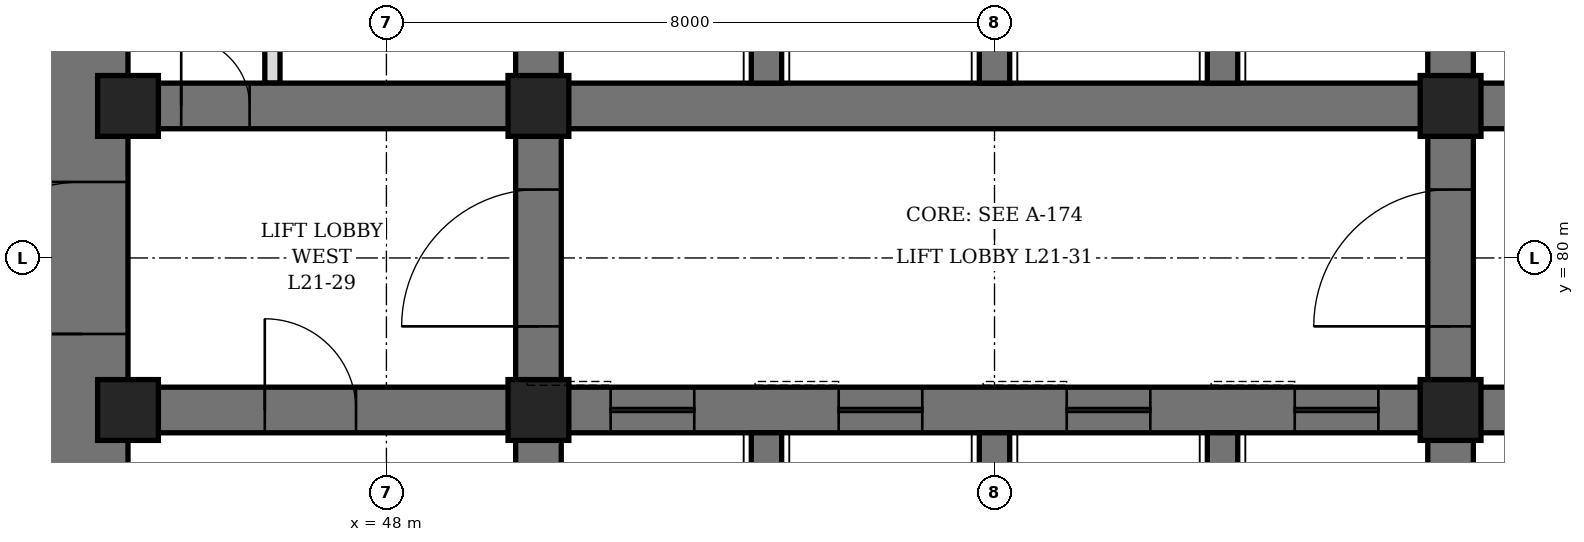
"""IFC4 building model, lengths in metres.
Left out: names, types, materials, properties, quantities, classifications, styles, units other than length and angle.
Written with IfcOpenShell. Run it as: python <this file> out.ifc"""

import sys

from ifc_helpers import new_model, si_unit, direction, frame, frame_2d, origin, origin_2d, place, context, subcontext, project, spatial, rectangle, hollow_rectangle, extrude, element, fill, save


model = new_model("IFC4")
c1 = context("Model", 3, precision=1e-05, world=origin(), true_north=direction((0.0, 1.0)))
c2 = subcontext(c1, "Body", "Model", "MODEL_VIEW")
j1 = project(units=[si_unit("LENGTHUNIT", "METRE"), si_unit("PLANEANGLEUNIT", "RADIAN")], contexts=[c1])
p1 = place(None, origin())
s1 = spatial("IfcSite", under=j1, at=p1, CompositionType="ELEMENT")
p2 = place(p1, origin())
s2 = spatial("IfcBuilding", under=s1, at=p2, CompositionType="ELEMENT")
p3 = place(p2, frame((0.0, 0.0, 97.9)))
s3 = spatial("IfcBuildingStorey", under=s2, at=p3, CompositionType="ELEMENT", Elevation=97.9)
p4 = place(p3, frame((44.0, 70.4, 0.0), z_axis=(0.0, 0.0, 1.0), x_axis=(0.0, 1.0, 0.0)))
e1 = element("IfcWall", 1, at=p4, inside=s3, PredefinedType="SHEAR", context=c2, shape_type="SweptSolid", body=[
    extrude(rectangle(XDim=19.2, YDim=1.2, at=frame_2d((9.6, 0.0))), origin(), (0.0, 0.0, 1.0), 4.2),
])
p5 = place(p4, frame((8.6, 0.0, 0.0)))
e2 = element("IfcOpeningElement", 2, at=p5, cuts=e1, PredefinedType="OPENING", context=c2, shape_type="SweptSolid", body=[
    extrude(rectangle(XDim=2.0, YDim=2.4, at=frame_2d((1.0, 1.2))), frame((0.0, 0.61, 0.0), z_axis=(0.0, -1.0, 0.0), x_axis=(1.0, 0.0, 0.0)), (0.0, 0.0, 1.0), 1.22),
])
p6 = place(p3, frame((50.0, 71.6, 0.0), z_axis=(0.0, 0.0, 1.0), x_axis=(0.0, 1.0, 0.0)))
e3 = element("IfcWall", 3, at=p6, inside=s3, PredefinedType="SHEAR", context=c2, shape_type="SweptSolid", body=[
    extrude(rectangle(XDim=16.8, YDim=0.6, at=frame_2d((8.4, 0.0))), origin(), (0.0, 0.0, 1.0), 4.2),
])
p7 = place(p6, frame((7.5, 0.0, 0.0)))
e4 = element("IfcOpeningElement", 4, at=p7, cuts=e3, PredefinedType="OPENING", context=c2, shape_type="SweptSolid", body=[
    extrude(rectangle(XDim=1.8, YDim=2.4, at=frame_2d((0.9, 1.2))), frame((0.0, 0.31, 0.0), z_axis=(0.0, -1.0, 0.0), x_axis=(1.0, 0.0, 0.0)), (0.0, 0.0, 1.0), 0.62),
])
p8 = place(p3, frame((62.0, 71.6, 0.0), z_axis=(0.0, 0.0, 1.0), x_axis=(0.0, 1.0, 0.0)))
e5 = element("IfcWall", 5, at=p8, inside=s3, PredefinedType="SHEAR", context=c2, shape_type="SweptSolid", body=[
    extrude(rectangle(XDim=16.8, YDim=0.6, at=frame_2d((8.4, 0.0))), origin(), (0.0, 0.0, 1.0), 4.2),
])
p9 = place(p8, frame((7.5, 0.0, 0.0)))
e6 = element("IfcOpeningElement", 6, at=p9, cuts=e5, PredefinedType="OPENING", context=c2, shape_type="SweptSolid", body=[
    extrude(rectangle(XDim=1.8, YDim=2.4, at=frame_2d((0.9, 1.2))), frame((0.0, 0.31, 0.0), z_axis=(0.0, -1.0, 0.0), x_axis=(1.0, 0.0, 0.0)), (0.0, 0.0, 1.0), 0.62),
])
p10 = place(p3, frame((44.6, 78.0, 0.0), z_axis=(0.0, 0.0, 1.0), x_axis=(1.0, 0.0, 0.0)))
e7 = element("IfcWall", 7, at=p10, inside=s3, PredefinedType="SHEAR", context=c2, shape_type="SweptSolid", body=[
    extrude(rectangle(XDim=5.1, YDim=0.6, at=frame_2d((2.55, 0.0))), origin(), (0.0, 0.0, 1.0), 4.2),
])
p11 = place(p10, frame((1.8, 0.0, 0.0)))
e8 = element("IfcOpeningElement", 8, at=p11, cuts=e7, PredefinedType="OPENING", context=c2, shape_type="SweptSolid", body=[
    extrude(rectangle(XDim=1.2, YDim=2.1, at=frame_2d((0.6, 1.05))), frame((0.0, 0.31, 0.0), z_axis=(0.0, -1.0, 0.0), x_axis=(1.0, 0.0, 0.0)), (0.0, 0.0, 1.0), 0.62),
])
p12 = place(p3, frame((44.6, 82.0, 0.0), z_axis=(0.0, 0.0, 1.0), x_axis=(1.0, 0.0, 0.0)))
e9 = element("IfcWall", 9, at=p12, inside=s3, PredefinedType="SHEAR", context=c2, shape_type="SweptSolid", body=[
    extrude(rectangle(XDim=5.1, YDim=0.6, at=frame_2d((2.55, 0.0))), origin(), (0.0, 0.0, 1.0), 4.2),
])
p13 = place(p12, frame((0.7, 0.0, 0.0)))
e10 = element("IfcOpeningElement", 10, at=p13, cuts=e9, PredefinedType="OPENING", context=c2, shape_type="SweptSolid", body=[
    extrude(rectangle(XDim=0.9, YDim=2.1, at=frame_2d((0.45, 1.05))), frame((0.0, 0.31, 0.0), z_axis=(0.0, -1.0, 0.0), x_axis=(1.0, 0.0, 0.0)), (0.0, 0.0, 1.0), 0.62),
])
p14 = place(p3, frame((62.3, 78.0, 0.0), z_axis=(0.0, 0.0, 1.0), x_axis=(1.0, 0.0, 0.0)))
e11 = element("IfcWall", 11, at=p14, inside=s3, PredefinedType="SHEAR", context=c2, shape_type="SweptSolid", body=[
    extrude(rectangle(XDim=5.1, YDim=0.6, at=frame_2d((2.55, 0.0))), origin(), (0.0, 0.0, 1.0), 4.2),
])
p15 = place(p14, frame((2.1, 0.0, 0.0)))
e12 = element("IfcOpeningElement", 12, at=p15, cuts=e11, PredefinedType="OPENING", context=c2, shape_type="SweptSolid", body=[
    extrude(rectangle(XDim=1.2, YDim=2.1, at=frame_2d((0.6, 1.05))), frame((0.0, 0.31, 0.0), z_axis=(0.0, -1.0, 0.0), x_axis=(1.0, 0.0, 0.0)), (0.0, 0.0, 1.0), 0.62),
])
p16 = place(p3, frame((62.3, 82.0, 0.0), z_axis=(0.0, 0.0, 1.0), x_axis=(1.0, 0.0, 0.0)))
e13 = element("IfcWall", 13, at=p16, inside=s3, PredefinedType="SHEAR", context=c2, shape_type="SweptSolid", body=[
    extrude(rectangle(XDim=5.1, YDim=0.6, at=frame_2d((2.55, 0.0))), origin(), (0.0, 0.0, 1.0), 4.2),
])
p17 = place(p16, frame((2.1, 0.0, 0.0)))
e14 = element("IfcOpeningElement", 14, at=p17, cuts=e13, PredefinedType="OPENING", context=c2, shape_type="SweptSolid", body=[
    extrude(rectangle(XDim=1.2, YDim=2.1, at=frame_2d((0.6, 1.05))), frame((0.0, 0.31, 0.0), z_axis=(0.0, -1.0, 0.0), x_axis=(1.0, 0.0, 0.0)), (0.0, 0.0, 1.0), 0.62),
])
p18 = place(p3, frame((50.3, 78.0, 0.0), z_axis=(0.0, 0.0, 1.0), x_axis=(1.0, 0.0, 0.0)))
e15 = element("IfcWall", 15, at=p18, inside=s3, PredefinedType="SHEAR", context=c2, shape_type="SweptSolid", body=[
    extrude(rectangle(XDim=11.4, YDim=0.6, at=frame_2d((5.7, 0.0))), origin(), (0.0, 0.0, 1.0), 4.2),
])
p19 = place(p18, frame((0.65, 0.0, 0.0)))
e16 = element("IfcOpeningElement", 16, at=p19, cuts=e15, PredefinedType="OPENING", context=c2, shape_type="SweptSolid", body=[
    extrude(rectangle(XDim=1.1, YDim=2.2, at=frame_2d((0.55, 1.1))), frame((0.0, 0.31, 0.0), z_axis=(0.0, -1.0, 0.0), x_axis=(1.0, 0.0, 0.0)), (0.0, 0.0, 1.0), 0.62),
])
p20 = place(p18, frame((3.65, 0.0, 0.0)))
e17 = element("IfcOpeningElement", 17, at=p20, cuts=e15, PredefinedType="OPENING", context=c2, shape_type="SweptSolid", body=[
    extrude(rectangle(XDim=1.1, YDim=2.2, at=frame_2d((0.55, 1.1))), frame((0.0, 0.31, 0.0), z_axis=(0.0, -1.0, 0.0), x_axis=(1.0, 0.0, 0.0)), (0.0, 0.0, 1.0), 0.62),
])
p21 = place(p18, frame((6.65, 0.0, 0.0)))
e18 = element("IfcOpeningElement", 18, at=p21, cuts=e15, PredefinedType="OPENING", context=c2, shape_type="SweptSolid", body=[
    extrude(rectangle(XDim=1.1, YDim=2.2, at=frame_2d((0.55, 1.1))), frame((0.0, 0.31, 0.0), z_axis=(0.0, -1.0, 0.0), x_axis=(1.0, 0.0, 0.0)), (0.0, 0.0, 1.0), 0.62),
])
p22 = place(p18, frame((9.65, 0.0, 0.0)))
e19 = element("IfcOpeningElement", 19, at=p22, cuts=e15, PredefinedType="OPENING", context=c2, shape_type="SweptSolid", body=[
    extrude(rectangle(XDim=1.1, YDim=2.2, at=frame_2d((0.55, 1.1))), frame((0.0, 0.31, 0.0), z_axis=(0.0, -1.0, 0.0), x_axis=(1.0, 0.0, 0.0)), (0.0, 0.0, 1.0), 0.62),
])
p23 = place(p3, frame((50.3, 82.0, 0.0), z_axis=(0.0, 0.0, 1.0), x_axis=(1.0, 0.0, 0.0)))
e20 = element("IfcWall", 20, at=p23, inside=s3, PredefinedType="SHEAR", context=c2, shape_type="SweptSolid", body=[
    extrude(rectangle(XDim=11.4, YDim=0.6, at=frame_2d((5.7, 0.0))), origin(), (0.0, 0.0, 1.0), 4.2),
])
p24 = place(p3, frame((53.0, 74.2, 0.0), z_axis=(0.0, 0.0, 1.0), x_axis=(0.0, 1.0, 0.0)))
e21 = element("IfcWall", 21, at=p24, inside=s3, PredefinedType="SHEAR", context=c2, shape_type="SweptSolid", body=[
    extrude(rectangle(XDim=3.5, YDim=0.4, at=frame_2d((1.75, 0.0))), origin(), (0.0, 0.0, 1.0), 4.2),
])
p25 = place(p3, frame((53.0, 82.3, 0.0), z_axis=(0.0, 0.0, 1.0), x_axis=(0.0, 1.0, 0.0)))
e22 = element("IfcWall", 22, at=p25, inside=s3, PredefinedType="SHEAR", context=c2, shape_type="SweptSolid", body=[
    extrude(rectangle(XDim=3.4, YDim=0.4, at=frame_2d((1.7, 0.0))), origin(), (0.0, 0.0, 1.0), 4.2),
])
p26 = place(p3, frame((56.0, 74.2, 0.0), z_axis=(0.0, 0.0, 1.0), x_axis=(0.0, 1.0, 0.0)))
e23 = element("IfcWall", 23, at=p26, inside=s3, PredefinedType="SHEAR", context=c2, shape_type="SweptSolid", body=[
    extrude(rectangle(XDim=3.5, YDim=0.4, at=frame_2d((1.75, 0.0))), origin(), (0.0, 0.0, 1.0), 4.2),
])
p27 = place(p3, frame((56.0, 82.3, 0.0), z_axis=(0.0, 0.0, 1.0), x_axis=(0.0, 1.0, 0.0)))
e24 = element("IfcWall", 24, at=p27, inside=s3, PredefinedType="SHEAR", context=c2, shape_type="SweptSolid", body=[
    extrude(rectangle(XDim=3.4, YDim=0.4, at=frame_2d((1.7, 0.0))), origin(), (0.0, 0.0, 1.0), 4.2),
])
p28 = place(p3, frame((59.0, 74.2, 0.0), z_axis=(0.0, 0.0, 1.0), x_axis=(0.0, 1.0, 0.0)))
e25 = element("IfcWall", 25, at=p28, inside=s3, PredefinedType="SHEAR", context=c2, shape_type="SweptSolid", body=[
    extrude(rectangle(XDim=3.5, YDim=0.4, at=frame_2d((1.75, 0.0))), origin(), (0.0, 0.0, 1.0), 4.2),
])
p29 = place(p3, frame((59.0, 82.3, 0.0), z_axis=(0.0, 0.0, 1.0), x_axis=(0.0, 1.0, 0.0)))
e26 = element("IfcWall", 26, at=p29, inside=s3, PredefinedType="SHEAR", context=c2, shape_type="SweptSolid", body=[
    extrude(rectangle(XDim=3.4, YDim=0.4, at=frame_2d((1.7, 0.0))), origin(), (0.0, 0.0, 1.0), 4.2),
])
for number, where, z_axis, x_axis in (
    (27, (44.6, 78.0, 0.0), (0.0, 0.0, 1.0), (1.0, 0.0, 0.0)),
    (28, (44.6, 82.0, 0.0), (0.0, 0.0, 1.0), (1.0, 0.0, 0.0)),
    (29, (50.0, 78.0, 0.0), (0.0, 0.0, 1.0), (1.0, 0.0, 0.0)),
    (30, (50.0, 82.0, 0.0), (0.0, 0.0, 1.0), (1.0, 0.0, 0.0)),
    (31, (62.0, 78.0, 0.0), (0.0, 0.0, 1.0), (1.0, 0.0, 0.0)),
    (32, (62.0, 82.0, 0.0), (0.0, 0.0, 1.0), (1.0, 0.0, 0.0)),
):
    element("IfcColumn", number, at=place(p3, frame(where, z_axis=z_axis, x_axis=x_axis)), inside=s3, PredefinedType="COLUMN", context=c2, shape_type="SweptSolid", body=[
        extrude(hollow_rectangle(XDim=0.8, YDim=0.8, WallThickness=0.1, at=origin_2d()), origin(), (0.0, 0.0, 1.0), 4.2),
    ])
p30 = place(p3, frame((46.5, 82.3, 0.0), z_axis=(0.0, 0.0, 1.0), x_axis=(0.0, 1.0, 0.0)))
e33 = element("IfcWall", 33, at=p30, inside=s3, PredefinedType="PARTITIONING", context=c2, shape_type="SweptSolid", body=[
    extrude(rectangle(XDim=2.9, YDim=0.2, at=frame_2d((1.45, 0.0))), origin(), (0.0, 0.0, 1.0), 3.95),
])
p31 = place(p30, frame((1.0, 0.0, 0.0)))
e34 = element("IfcOpeningElement", 34, at=p31, cuts=e33, PredefinedType="OPENING", context=c2, shape_type="SweptSolid", body=[
    extrude(rectangle(XDim=0.9, YDim=2.1, at=frame_2d((0.45, 1.05))), frame((0.0, 0.11, 0.0), z_axis=(0.0, -1.0, 0.0), x_axis=(1.0, 0.0, 0.0)), (0.0, 0.0, 1.0), 0.22),
])
p32 = place(p13, origin())
e35 = element("IfcDoor", 35, at=p32, inside=s3, OperationType="SINGLE_SWING_LEFT", PredefinedType="DOOR", context=c2, shape_type="SweptSolid", body=[
    extrude(rectangle(XDim=0.9, YDim=2.1, at=frame_2d((0.45, 1.05))), frame((0.0, 0.3, 0.0), z_axis=(0.0, -1.0, 0.0), x_axis=(1.0, 0.0, 0.0)), (0.0, 0.0, 1.0), 0.6),
])
fill(e10, e35)
p33 = place(p11, origin())
e36 = element("IfcDoor", 36, at=p33, inside=s3, OperationType="SINGLE_SWING_LEFT", PredefinedType="DOOR", context=c2, shape_type="SweptSolid", body=[
    extrude(rectangle(XDim=1.2, YDim=2.1, at=frame_2d((0.6, 1.05))), frame((0.0, 0.3, 0.0), z_axis=(0.0, -1.0, 0.0), x_axis=(1.0, 0.0, 0.0)), (0.0, 0.0, 1.0), 0.6),
])
fill(e8, e36)
p34 = place(p5, origin())
e37 = element("IfcDoor", 37, at=p34, inside=s3, OperationType="DOUBLE_DOOR_SINGLE_SWING", PredefinedType="DOOR", context=c2, shape_type="SweptSolid", body=[
    extrude(rectangle(XDim=2.0, YDim=2.4, at=frame_2d((1.0, 1.2))), frame((0.0, 0.35, 0.0), z_axis=(0.0, -1.0, 0.0), x_axis=(1.0, 0.0, 0.0)), (0.0, 0.0, 1.0), 0.7),
])
fill(e2, e37)
p35 = place(p7, origin())
e38 = element("IfcDoor", 38, at=p35, inside=s3, OperationType="DOUBLE_DOOR_SINGLE_SWING", PredefinedType="DOOR", context=c2, shape_type="SweptSolid", body=[
    extrude(rectangle(XDim=1.8, YDim=2.4, at=frame_2d((0.9, 1.2))), frame((0.0, 0.3, 0.0), z_axis=(0.0, -1.0, 0.0), x_axis=(1.0, 0.0, 0.0)), (0.0, 0.0, 1.0), 0.6),
])
fill(e4, e38)
p36 = place(p9, origin())
e39 = element("IfcDoor", 39, at=p36, inside=s3, OperationType="DOUBLE_DOOR_SINGLE_SWING", PredefinedType="DOOR", context=c2, shape_type="SweptSolid", body=[
    extrude(rectangle(XDim=1.8, YDim=2.4, at=frame_2d((0.9, 1.2))), frame((0.0, 0.3, 0.0), z_axis=(0.0, -1.0, 0.0), x_axis=(1.0, 0.0, 0.0)), (0.0, 0.0, 1.0), 0.6),
])
fill(e6, e39)
p37 = place(p19, origin())
e40 = element("IfcDoor", 40, at=p37, inside=s3, OperationType="SLIDING_TO_LEFT", PredefinedType="DOOR", context=c2, shape_type="SweptSolid", body=[
    extrude(rectangle(XDim=1.1, YDim=2.2, at=frame_2d((0.55, 1.1))), frame((0.0, 0.3, 0.0), z_axis=(0.0, -1.0, 0.0), x_axis=(1.0, 0.0, 0.0)), (0.0, 0.0, 1.0), 0.6),
])
fill(e16, e40)
p38 = place(p20, origin())
e41 = element("IfcDoor", 41, at=p38, inside=s3, OperationType="SLIDING_TO_LEFT", PredefinedType="DOOR", context=c2, shape_type="SweptSolid", body=[
    extrude(rectangle(XDim=1.1, YDim=2.2, at=frame_2d((0.55, 1.1))), frame((0.0, 0.3, 0.0), z_axis=(0.0, -1.0, 0.0), x_axis=(1.0, 0.0, 0.0)), (0.0, 0.0, 1.0), 0.6),
])
fill(e17, e41)
p39 = place(p21, origin())
e42 = element("IfcDoor", 42, at=p39, inside=s3, OperationType="SLIDING_TO_LEFT", PredefinedType="DOOR", context=c2, shape_type="SweptSolid", body=[
    extrude(rectangle(XDim=1.1, YDim=2.2, at=frame_2d((0.55, 1.1))), frame((0.0, 0.3, 0.0), z_axis=(0.0, -1.0, 0.0), x_axis=(1.0, 0.0, 0.0)), (0.0, 0.0, 1.0), 0.6),
])
fill(e18, e42)
p40 = place(p22, origin())
e43 = element("IfcDoor", 43, at=p40, inside=s3, OperationType="SLIDING_TO_LEFT", PredefinedType="DOOR", context=c2, shape_type="SweptSolid", body=[
    extrude(rectangle(XDim=1.1, YDim=2.2, at=frame_2d((0.55, 1.1))), frame((0.0, 0.3, 0.0), z_axis=(0.0, -1.0, 0.0), x_axis=(1.0, 0.0, 0.0)), (0.0, 0.0, 1.0), 0.6),
])
fill(e19, e43)
save(model, sys.argv[1])
